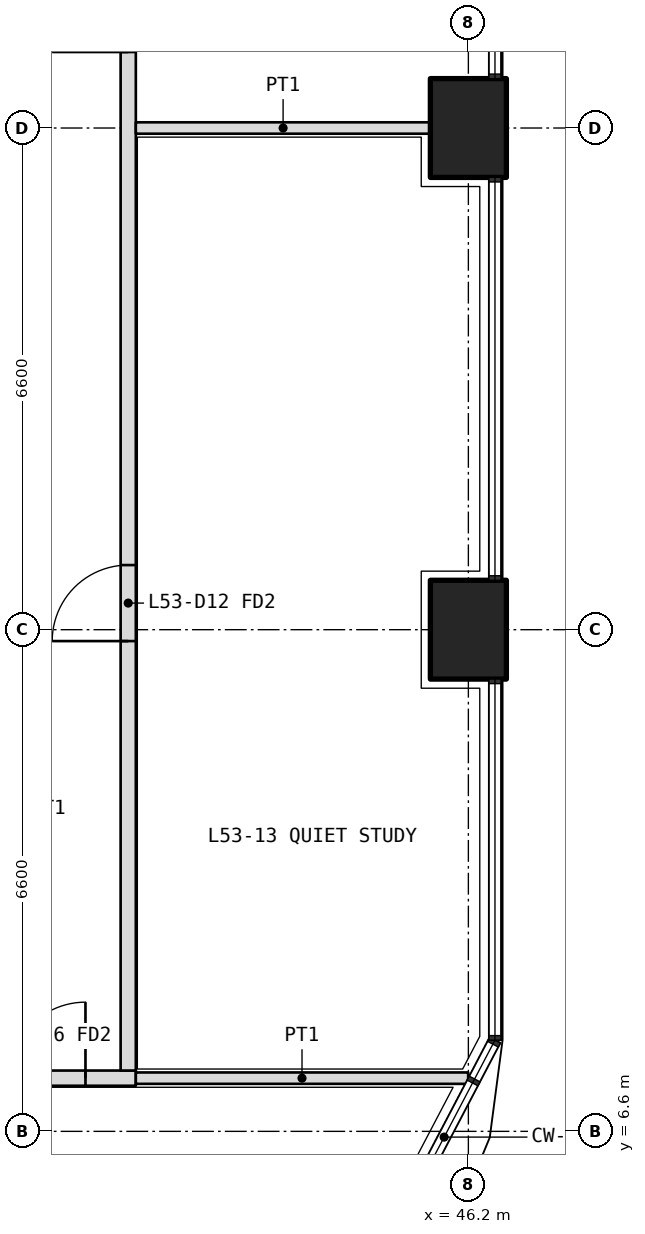
"""IFC4 building model, lengths in metres.
Left out: names, types, materials, properties, quantities, classifications, styles, units other than length and angle.
Written with IfcOpenShell. Run it as: python <this file> out.ifc"""

import sys

from ifc_helpers import new_model, si_unit, direction, frame, frame_2d, origin, origin_2d, place, context, subcontext, project, spatial, rectangle, extrude, element, fill, save


model = new_model("IFC4")
c1 = context("Model", 3, precision=1e-05, world=origin(), true_north=direction((0.0, 1.0)))
c2 = subcontext(c1, "Body", "Model", "MODEL_VIEW")
j1 = project(units=[si_unit("LENGTHUNIT", "METRE"), si_unit("PLANEANGLEUNIT", "RADIAN")], contexts=[c1])
p1 = place(None, origin())
s1 = spatial("IfcSite", under=j1, at=p1, CompositionType="ELEMENT")
p2 = place(p1, origin())
s2 = spatial("IfcBuilding", under=s1, at=p2, CompositionType="ELEMENT")
p3 = place(p2, frame((0.0, 0.0, 233.4)))
s3 = spatial("IfcBuildingStorey", under=s2, at=p3, CompositionType="ELEMENT", Elevation=233.4)
for number, where, z_axis, x_axis in (
    (1, (46.2, 13.2, 0.0), (0.0, 0.0, 1.0), (0.0, 1.0, 0.0)),
    (2, (46.2, 19.8, 0.0), (0.0, 0.0, 1.0), (0.0, 1.0, 0.0)),
):
    element("IfcColumn", number, at=place(p3, frame(where, z_axis=z_axis, x_axis=x_axis)), inside=s3, PredefinedType="COLUMN", context=c2, shape_type="SweptSolid", body=[
        extrude(rectangle(XDim=1.3, YDim=1.0, at=origin_2d()), origin(), (0.0, 0.0, 1.0), 4.2),
    ])
p4 = place(p3, frame((10.975, 7.3, 0.0), z_axis=(0.0, 0.0, 1.0), x_axis=(1.0, 0.0, 0.0)))
e3 = element("IfcWall", 3, at=p4, inside=s3, PredefinedType="PARTITIONING", context=c2, shape_type="SweptSolid", body=[
    extrude(rectangle(XDim=30.85, YDim=0.2, at=frame_2d((15.425, 0.0))), origin(), (0.0, 0.0, 1.0), 3.0),
])
p5 = place(p4, frame((2.312, 0.0, 0.0)))
e4 = element("IfcOpeningElement", 4, at=p5, cuts=e3, PredefinedType="OPENING", context=c2, shape_type="SweptSolid", body=[
    extrude(rectangle(XDim=1.0, YDim=2.1, at=frame_2d((0.5, 1.05))), frame((0.0, 0.11, 0.0), z_axis=(0.0, -1.0, 0.0), x_axis=(1.0, 0.0, 0.0)), (0.0, 0.0, 1.0), 0.22),
])
p6 = place(p4, frame((13.275, 0.0, 0.0)))
e5 = element("IfcOpeningElement", 5, at=p6, cuts=e3, PredefinedType="OPENING", context=c2, shape_type="SweptSolid", body=[
    extrude(rectangle(XDim=1.0, YDim=2.1, at=frame_2d((0.5, 1.05))), frame((0.0, 0.11, 0.0), z_axis=(0.0, -1.0, 0.0), x_axis=(1.0, 0.0, 0.0)), (0.0, 0.0, 1.0), 0.22),
])
p7 = place(p4, frame((23.625, 0.0, 0.0)))
e6 = element("IfcOpeningElement", 6, at=p7, cuts=e3, PredefinedType="OPENING", context=c2, shape_type="SweptSolid", body=[
    extrude(rectangle(XDim=1.0, YDim=2.1, at=frame_2d((0.5, 1.05))), frame((0.0, 0.11, 0.0), z_axis=(0.0, -1.0, 0.0), x_axis=(1.0, 0.0, 0.0)), (0.0, 0.0, 1.0), 0.22),
])
p8 = place(p4, frame((26.925, 0.0, 0.0)))
e7 = element("IfcOpeningElement", 7, at=p8, cuts=e3, PredefinedType="OPENING", context=c2, shape_type="SweptSolid", body=[
    extrude(rectangle(XDim=1.0, YDim=2.1, at=frame_2d((0.5, 1.05))), frame((0.0, 0.11, 0.0), z_axis=(0.0, -1.0, 0.0), x_axis=(1.0, 0.0, 0.0)), (0.0, 0.0, 1.0), 0.22),
])
p9 = place(p4, frame((29.188, 0.0, 0.0)))
e8 = element("IfcOpeningElement", 8, at=p9, cuts=e3, PredefinedType="OPENING", context=c2, shape_type="SweptSolid", body=[
    extrude(rectangle(XDim=1.0, YDim=2.1, at=frame_2d((0.5, 1.05))), frame((0.0, 0.11, 0.0), z_axis=(0.0, -1.0, 0.0), x_axis=(1.0, 0.0, 0.0)), (0.0, 0.0, 1.0), 0.22),
])
p10 = place(p3, frame((41.725, 7.4, 0.0), z_axis=(0.0, 0.0, 1.0), x_axis=(0.0, 1.0, 0.0)))
e9 = element("IfcWall", 9, at=p10, inside=s3, PredefinedType="PARTITIONING", context=c2, shape_type="SweptSolid", body=[
    extrude(rectangle(XDim=31.4, YDim=0.2, at=frame_2d((15.7, 0.0))), origin(), (0.0, 0.0, 1.0), 3.0),
])
p11 = place(p10, frame((5.65, 0.0, 0.0)))
e10 = element("IfcOpeningElement", 10, at=p11, cuts=e9, PredefinedType="OPENING", context=c2, shape_type="SweptSolid", body=[
    extrude(rectangle(XDim=1.0, YDim=2.1, at=frame_2d((0.5, 1.05))), frame((0.0, 0.11, 0.0), z_axis=(0.0, -1.0, 0.0), x_axis=(1.0, 0.0, 0.0)), (0.0, 0.0, 1.0), 0.22),
])
p12 = place(p10, frame((13.4, 0.0, 0.0)))
e11 = element("IfcOpeningElement", 11, at=p12, cuts=e9, PredefinedType="OPENING", context=c2, shape_type="SweptSolid", body=[
    extrude(rectangle(XDim=1.0, YDim=2.1, at=frame_2d((0.5, 1.05))), frame((0.0, 0.11, 0.0), z_axis=(0.0, -1.0, 0.0), x_axis=(1.0, 0.0, 0.0)), (0.0, 0.0, 1.0), 0.22),
])
p13 = place(p10, frame((16.75, 0.0, 0.0)))
e12 = element("IfcOpeningElement", 12, at=p13, cuts=e9, PredefinedType="OPENING", context=c2, shape_type="SweptSolid", body=[
    extrude(rectangle(XDim=0.9, YDim=2.1, at=frame_2d((0.45, 1.05))), frame((0.0, 0.11, 0.0), z_axis=(0.0, -1.0, 0.0), x_axis=(1.0, 0.0, 0.0)), (0.0, 0.0, 1.0), 0.22),
])
p14 = place(p10, frame((20.15, 0.0, 0.0)))
e13 = element("IfcOpeningElement", 13, at=p14, cuts=e9, PredefinedType="OPENING", context=c2, shape_type="SweptSolid", body=[
    extrude(rectangle(XDim=1.0, YDim=2.1, at=frame_2d((0.5, 1.05))), frame((0.0, 0.11, 0.0), z_axis=(0.0, -1.0, 0.0), x_axis=(1.0, 0.0, 0.0)), (0.0, 0.0, 1.0), 0.22),
])
p15 = place(p10, frame((26.4, 0.0, 0.0)))
e14 = element("IfcOpeningElement", 14, at=p15, cuts=e9, PredefinedType="OPENING", context=c2, shape_type="SweptSolid", body=[
    extrude(rectangle(XDim=1.0, YDim=2.1, at=frame_2d((0.5, 1.05))), frame((0.0, 0.11, 0.0), z_axis=(0.0, -1.0, 0.0), x_axis=(1.0, 0.0, 0.0)), (0.0, 0.0, 1.0), 0.22),
])
p16 = place(p3, frame((46.198, 7.3, 0.0), z_axis=(0.0, 0.0, 1.0), x_axis=(-1.0, 0.0, 0.0)))
e15 = element("IfcWall", 15, at=p16, inside=s3, PredefinedType="PARTITIONING", context=c2, shape_type="SweptSolid", body=[
    extrude(rectangle(XDim=4.373, YDim=0.15, at=frame_2d((2.186, 0.0))), origin(), (0.0, 0.0, 1.0), 2.7),
])
p17 = place(p3, frame((45.7, 19.8, 0.0), z_axis=(0.0, 0.0, 1.0), x_axis=(-1.0, 0.0, 0.0)))
e16 = element("IfcWall", 16, at=p17, inside=s3, PredefinedType="PARTITIONING", context=c2, shape_type="SweptSolid", body=[
    extrude(rectangle(XDim=3.875, YDim=0.15, at=frame_2d((1.938, 0.0))), origin(), (0.0, 0.0, 1.0), 3.0),
])
p18 = place(p9, origin())
e17 = element("IfcDoor", 17, at=p18, inside=s3, OperationType="SINGLE_SWING_RIGHT", PredefinedType="DOOR", context=c2, shape_type="SweptSolid", body=[
    extrude(rectangle(XDim=1.0, YDim=2.1, at=frame_2d((0.5, 1.05))), frame((0.0, 0.025, 0.0), z_axis=(0.0, -1.0, 0.0), x_axis=(1.0, 0.0, 0.0)), (0.0, 0.0, 1.0), 0.05),
])
fill(e8, e17)
p19 = place(p11, origin())
e18 = element("IfcDoor", 18, at=p19, inside=s3, OperationType="SINGLE_SWING_LEFT", PredefinedType="DOOR", context=c2, shape_type="SweptSolid", body=[
    extrude(rectangle(XDim=1.0, YDim=2.1, at=frame_2d((0.5, 1.05))), frame((0.0, 0.025, 0.0), z_axis=(0.0, -1.0, 0.0), x_axis=(1.0, 0.0, 0.0)), (0.0, 0.0, 1.0), 0.05),
])
fill(e10, e18)
p20 = place(p12, origin())
e19 = element("IfcDoor", 19, at=p20, inside=s3, OperationType="SINGLE_SWING_LEFT", PredefinedType="DOOR", context=c2, shape_type="SweptSolid", body=[
    extrude(rectangle(XDim=1.0, YDim=2.1, at=frame_2d((0.5, 1.05))), frame((0.0, 0.025, 0.0), z_axis=(0.0, -1.0, 0.0), x_axis=(1.0, 0.0, 0.0)), (0.0, 0.0, 1.0), 0.05),
])
fill(e11, e19)
save(model, sys.argv[1])
